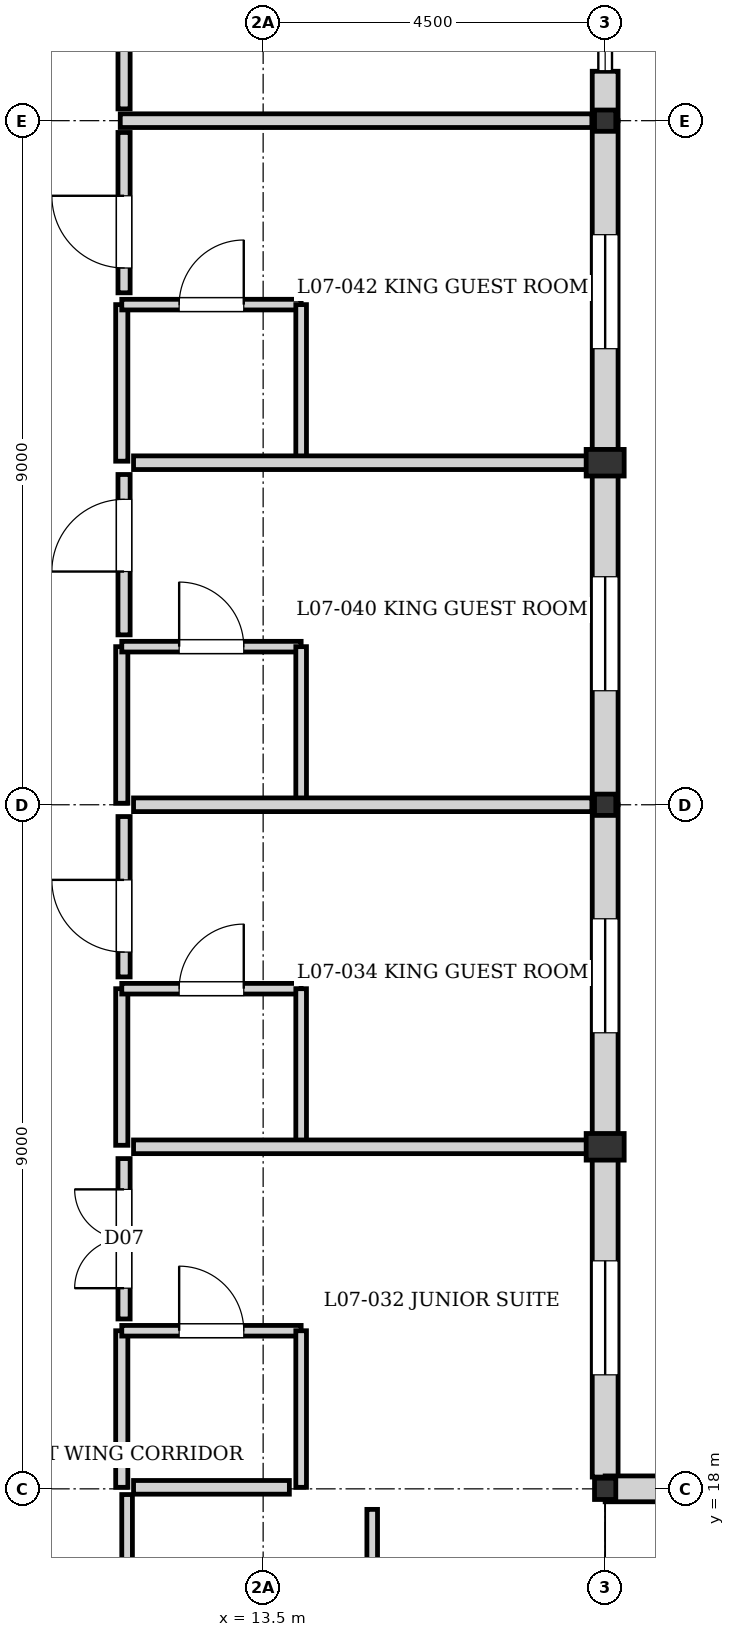
"""IFC4 building model, lengths in metres.
Left out: names, types, materials, properties, quantities, classifications, styles, units other than length and angle.
Written with IfcOpenShell. Run it as: python <this file> out.ifc"""

import sys

from ifc_helpers import new_model, si_unit, direction, frame, frame_2d, origin, origin_2d, place, context, subcontext, project, spatial, rectangle, i_section, extrude, element, fill, save


model = new_model("IFC4")
c1 = context("Model", 3, precision=1e-05, world=origin(), true_north=direction((0.0, 1.0)))
c2 = subcontext(c1, "Body", "Model", "MODEL_VIEW")
j1 = project(units=[si_unit("LENGTHUNIT", "METRE"), si_unit("PLANEANGLEUNIT", "RADIAN")], contexts=[c1])
p1 = place(None, origin())
s1 = spatial("IfcSite", under=j1, at=p1, CompositionType="ELEMENT")
p2 = place(p1, origin())
s2 = spatial("IfcBuilding", under=s1, at=p2, CompositionType="ELEMENT")
p3 = place(p2, frame((0.0, 0.0, 23.68)))
s3 = spatial("IfcBuildingStorey", under=s2, at=p3, CompositionType="ELEMENT", Elevation=23.68)
for number, where, z_axis, x_axis in (
    (1, (18.0, 18.0, 0.0), (0.0, 0.0, 1.0), (1.0, 0.0, 0.0)),
    (2, (18.0, 27.0, 0.0), (0.0, 0.0, 1.0), (1.0, 0.0, 0.0)),
    (3, (18.0, 36.0, 0.0), (0.0, 0.0, 1.0), (1.0, 0.0, 0.0)),
):
    element("IfcColumn", number, at=place(p3, frame(where, z_axis=z_axis, x_axis=x_axis)), inside=s3, PredefinedType="COLUMN", context=c2, shape_type="SweptSolid", body=[
        extrude(i_section(OverallWidth=0.28, OverallDepth=0.28, WebThickness=0.01, FlangeThickness=0.018, at=origin_2d()), origin(), (0.0, 0.0, 1.0), 3.2),
    ])
for number, where, z_axis, x_axis in (
    (4, (18.0, 22.5, 0.0), (0.0, 0.0, 1.0), (0.0, 1.0, 0.0)),
    (5, (18.0, 31.5, 0.0), (0.0, 0.0, 1.0), (0.0, 1.0, 0.0)),
):
    element("IfcColumn", number, at=place(p3, frame(where, z_axis=z_axis, x_axis=x_axis)), inside=s3, PredefinedType="PILASTER", context=c2, shape_type="SweptSolid", body=[
        extrude(rectangle(XDim=0.35, YDim=0.5, at=origin_2d()), origin(), (0.0, 0.0, 1.0), 3.2),
    ])
p4 = place(p3, frame((18.0, 36.65, 0.0), z_axis=(0.0, 0.0, 1.0), x_axis=(0.0, -1.0, 0.0)))
e6 = element("IfcWall", 6, at=p4, inside=s3, PredefinedType="SOLIDWALL", context=c2, shape_type="SweptSolid", body=[
    extrude(rectangle(XDim=0.65, YDim=0.34, at=frame_2d((0.325, 0.0))), origin(), (0.0, 0.0, 1.0), 2.6),
])
p5 = place(p3, frame((18.0, 36.0, 0.0), z_axis=(0.0, 0.0, 1.0), x_axis=(0.0, -1.0, 0.0)))
e7 = element("IfcWall", 7, at=p5, inside=s3, PredefinedType="SOLIDWALL", context=c2, shape_type="SweptSolid", body=[
    extrude(rectangle(XDim=9.0, YDim=0.34, at=frame_2d((4.5, 0.0))), origin(), (0.0, 0.0, 1.0), 2.66),
])
p6 = place(p5, frame((1.5, 0.0, 0.35)))
e8 = element("IfcOpeningElement", 8, at=p6, cuts=e7, PredefinedType="OPENING", context=c2, shape_type="SweptSolid", body=[
    extrude(rectangle(XDim=1.5, YDim=1.8, at=frame_2d((0.75, 0.9))), frame((0.0, 0.18, 0.0), z_axis=(0.0, -1.0, 0.0), x_axis=(1.0, 0.0, 0.0)), (0.0, 0.0, 1.0), 0.36),
])
p7 = place(p5, frame((6.0, 0.0, 0.35)))
e9 = element("IfcOpeningElement", 9, at=p7, cuts=e7, PredefinedType="OPENING", context=c2, shape_type="SweptSolid", body=[
    extrude(rectangle(XDim=1.5, YDim=1.8, at=frame_2d((0.75, 0.9))), frame((0.0, 0.18, 0.0), z_axis=(0.0, -1.0, 0.0), x_axis=(1.0, 0.0, 0.0)), (0.0, 0.0, 1.0), 0.36),
])
p8 = place(p3, frame((18.0, 27.0, 0.0), z_axis=(0.0, 0.0, 1.0), x_axis=(0.0, -1.0, 0.0)))
e10 = element("IfcWall", 10, at=p8, inside=s3, PredefinedType="SOLIDWALL", context=c2, shape_type="SweptSolid", body=[
    extrude(rectangle(XDim=8.845, YDim=0.34, at=frame_2d((4.422, 0.0))), origin(), (0.0, 0.0, 1.0), 2.96),
])
p9 = place(p8, frame((1.5, 0.0, 0.35)))
e11 = element("IfcOpeningElement", 11, at=p9, cuts=e10, PredefinedType="OPENING", context=c2, shape_type="SweptSolid", body=[
    extrude(rectangle(XDim=1.5, YDim=1.8, at=frame_2d((0.75, 0.9))), frame((0.0, 0.18, 0.0), z_axis=(0.0, -1.0, 0.0), x_axis=(1.0, 0.0, 0.0)), (0.0, 0.0, 1.0), 0.36),
])
p10 = place(p8, frame((6.0, 0.0, 0.35)))
e12 = element("IfcOpeningElement", 12, at=p10, cuts=e10, PredefinedType="OPENING", context=c2, shape_type="SweptSolid", body=[
    extrude(rectangle(XDim=1.5, YDim=1.8, at=frame_2d((0.75, 0.9))), frame((0.0, 0.18, 0.0), z_axis=(0.0, -1.0, 0.0), x_axis=(1.0, 0.0, 0.0)), (0.0, 0.0, 1.0), 0.36),
])
p11 = place(p3, frame((18.0, 18.0, 0.0), z_axis=(0.0, 0.0, 1.0), x_axis=(1.0, 0.0, 0.0)))
e13 = element("IfcWall", 13, at=p11, inside=s3, PredefinedType="SOLIDWALL", context=c2, shape_type="SweptSolid", body=[
    extrude(rectangle(XDim=9.0, YDim=0.34, at=frame_2d((4.5, 0.0))), origin(), (0.0, 0.0, 1.0), 2.56),
])
p12 = place(p11, frame((1.5, 0.0, 0.35)))
e14 = element("IfcOpeningElement", 14, at=p12, cuts=e13, PredefinedType="OPENING", context=c2, shape_type="SweptSolid", body=[
    extrude(rectangle(XDim=1.5, YDim=1.8, at=frame_2d((0.75, 0.9))), frame((0.0, 0.18, 0.0), z_axis=(0.0, -1.0, 0.0), x_axis=(1.0, 0.0, 0.0)), (0.0, 0.0, 1.0), 0.36),
])
p13 = place(p11, frame((6.0, 0.0, 0.35)))
e15 = element("IfcOpeningElement", 15, at=p13, cuts=e13, PredefinedType="OPENING", context=c2, shape_type="SweptSolid", body=[
    extrude(rectangle(XDim=1.5, YDim=1.8, at=frame_2d((0.75, 0.9))), frame((0.0, 0.18, 0.0), z_axis=(0.0, -1.0, 0.0), x_axis=(1.0, 0.0, 0.0)), (0.0, 0.0, 1.0), 0.36),
])
p14 = place(p3, frame((11.64, 18.02, 0.0), z_axis=(0.0, 0.0, 1.0), x_axis=(0.0, 1.0, 0.0)))
e16 = element("IfcWall", 16, at=p14, inside=s3, PredefinedType="PARTITIONING", context=c2, shape_type="SweptSolid", body=[
    extrude(rectangle(XDim=2.06, YDim=0.16, at=frame_2d((1.03, 0.0))), origin(), (0.0, 0.0, 1.0), 2.96),
])
p15 = place(p3, frame((11.64, 20.08, 0.0), z_axis=(0.0, 0.0, 1.0), x_axis=(1.0, 0.0, 0.0)))
e17 = element("IfcWall", 17, at=p15, inside=s3, PredefinedType="PLUMBINGWALL", context=c2, shape_type="SweptSolid", body=[
    extrude(rectangle(XDim=2.36, YDim=0.14, at=frame_2d((1.18, 0.0))), origin(), (0.0, 0.0, 1.0), 2.96),
])
p16 = place(p15, frame((0.755, 0.0, 0.0)))
e18 = element("IfcOpeningElement", 18, at=p16, cuts=e17, PredefinedType="OPENING", context=c2, shape_type="SweptSolid", body=[
    extrude(rectangle(XDim=0.85, YDim=2.04, at=frame_2d((0.425, 1.02))), frame((0.0, 0.08, 0.0), z_axis=(0.0, -1.0, 0.0), x_axis=(1.0, 0.0, 0.0)), (0.0, 0.0, 1.0), 0.16),
])
p17 = place(p3, frame((14.0, 18.02, 0.0), z_axis=(0.0, 0.0, 1.0), x_axis=(0.0, 1.0, 0.0)))
e19 = element("IfcWall", 19, at=p17, inside=s3, PredefinedType="PLUMBINGWALL", context=c2, shape_type="SweptSolid", body=[
    extrude(rectangle(XDim=2.06, YDim=0.14, at=frame_2d((1.03, 0.0))), origin(), (0.0, 0.0, 1.0), 2.96),
])
p18 = place(p3, frame((11.64, 22.52, 0.0), z_axis=(0.0, 0.0, 1.0), x_axis=(0.0, 1.0, 0.0)))
e20 = element("IfcWall", 20, at=p18, inside=s3, PredefinedType="PARTITIONING", context=c2, shape_type="SweptSolid", body=[
    extrude(rectangle(XDim=2.06, YDim=0.16, at=frame_2d((1.03, 0.0))), origin(), (0.0, 0.0, 1.0), 2.96),
])
p19 = place(p3, frame((11.64, 24.58, 0.0), z_axis=(0.0, 0.0, 1.0), x_axis=(1.0, 0.0, 0.0)))
e21 = element("IfcWall", 21, at=p19, inside=s3, PredefinedType="PLUMBINGWALL", context=c2, shape_type="SweptSolid", body=[
    extrude(rectangle(XDim=2.36, YDim=0.14, at=frame_2d((1.18, 0.0))), origin(), (0.0, 0.0, 1.0), 2.96),
])
p20 = place(p19, frame((0.755, 0.0, 0.0)))
e22 = element("IfcOpeningElement", 22, at=p20, cuts=e21, PredefinedType="OPENING", context=c2, shape_type="SweptSolid", body=[
    extrude(rectangle(XDim=0.85, YDim=2.04, at=frame_2d((0.425, 1.02))), frame((0.0, 0.08, 0.0), z_axis=(0.0, -1.0, 0.0), x_axis=(1.0, 0.0, 0.0)), (0.0, 0.0, 1.0), 0.16),
])
p21 = place(p3, frame((14.0, 22.52, 0.0), z_axis=(0.0, 0.0, 1.0), x_axis=(0.0, 1.0, 0.0)))
e23 = element("IfcWall", 23, at=p21, inside=s3, PredefinedType="PLUMBINGWALL", context=c2, shape_type="SweptSolid", body=[
    extrude(rectangle(XDim=2.06, YDim=0.14, at=frame_2d((1.03, 0.0))), origin(), (0.0, 0.0, 1.0), 2.96),
])
p22 = place(p3, frame((11.64, 27.02, 0.0), z_axis=(0.0, 0.0, 1.0), x_axis=(0.0, 1.0, 0.0)))
e24 = element("IfcWall", 24, at=p22, inside=s3, PredefinedType="PARTITIONING", context=c2, shape_type="SweptSolid", body=[
    extrude(rectangle(XDim=2.06, YDim=0.16, at=frame_2d((1.03, 0.0))), origin(), (0.0, 0.0, 1.0), 2.96),
])
p23 = place(p3, frame((11.64, 29.08, 0.0), z_axis=(0.0, 0.0, 1.0), x_axis=(1.0, 0.0, 0.0)))
e25 = element("IfcWall", 25, at=p23, inside=s3, PredefinedType="PLUMBINGWALL", context=c2, shape_type="SweptSolid", body=[
    extrude(rectangle(XDim=2.36, YDim=0.14, at=frame_2d((1.18, 0.0))), origin(), (0.0, 0.0, 1.0), 2.96),
])
p24 = place(p23, frame((0.755, 0.0, 0.0)))
e26 = element("IfcOpeningElement", 26, at=p24, cuts=e25, PredefinedType="OPENING", context=c2, shape_type="SweptSolid", body=[
    extrude(rectangle(XDim=0.85, YDim=2.04, at=frame_2d((0.425, 1.02))), frame((0.0, 0.08, 0.0), z_axis=(0.0, -1.0, 0.0), x_axis=(1.0, 0.0, 0.0)), (0.0, 0.0, 1.0), 0.16),
])
p25 = place(p3, frame((14.0, 27.02, 0.0), z_axis=(0.0, 0.0, 1.0), x_axis=(0.0, 1.0, 0.0)))
e27 = element("IfcWall", 27, at=p25, inside=s3, PredefinedType="PLUMBINGWALL", context=c2, shape_type="SweptSolid", body=[
    extrude(rectangle(XDim=2.06, YDim=0.14, at=frame_2d((1.03, 0.0))), origin(), (0.0, 0.0, 1.0), 2.96),
])
p26 = place(p3, frame((11.64, 31.52, 0.0), z_axis=(0.0, 0.0, 1.0), x_axis=(0.0, 1.0, 0.0)))
e28 = element("IfcWall", 28, at=p26, inside=s3, PredefinedType="PARTITIONING", context=c2, shape_type="SweptSolid", body=[
    extrude(rectangle(XDim=2.06, YDim=0.16, at=frame_2d((1.03, 0.0))), origin(), (0.0, 0.0, 1.0), 2.96),
])
p27 = place(p3, frame((11.64, 33.58, 0.0), z_axis=(0.0, 0.0, 1.0), x_axis=(1.0, 0.0, 0.0)))
e29 = element("IfcWall", 29, at=p27, inside=s3, PredefinedType="PLUMBINGWALL", context=c2, shape_type="SweptSolid", body=[
    extrude(rectangle(XDim=2.36, YDim=0.14, at=frame_2d((1.18, 0.0))), origin(), (0.0, 0.0, 1.0), 2.96),
])
p28 = place(p27, frame((0.755, 0.0, 0.0)))
e30 = element("IfcOpeningElement", 30, at=p28, cuts=e29, PredefinedType="OPENING", context=c2, shape_type="SweptSolid", body=[
    extrude(rectangle(XDim=0.85, YDim=2.04, at=frame_2d((0.425, 1.02))), frame((0.0, 0.08, 0.0), z_axis=(0.0, -1.0, 0.0), x_axis=(1.0, 0.0, 0.0)), (0.0, 0.0, 1.0), 0.16),
])
p29 = place(p3, frame((14.0, 31.52, 0.0), z_axis=(0.0, 0.0, 1.0), x_axis=(0.0, 1.0, 0.0)))
e31 = element("IfcWall", 31, at=p29, inside=s3, PredefinedType="PLUMBINGWALL", context=c2, shape_type="SweptSolid", body=[
    extrude(rectangle(XDim=2.06, YDim=0.14, at=frame_2d((1.03, 0.0))), origin(), (0.0, 0.0, 1.0), 2.96),
])
p30 = place(p3, frame((11.795, 22.5, 0.0), z_axis=(0.0, 0.0, 1.0), x_axis=(1.0, 0.0, 0.0)))
e32 = element("IfcWall", 32, at=p30, inside=s3, PredefinedType="PARTITIONING", context=c2, shape_type="SweptSolid", body=[
    extrude(rectangle(XDim=6.03, YDim=0.18, at=frame_2d((3.015, 0.0))), origin(), (0.0, 0.0, 1.0), 2.96),
])
p31 = place(p3, frame((11.795, 27.0, 0.0), z_axis=(0.0, 0.0, 1.0), x_axis=(1.0, 0.0, 0.0)))
e33 = element("IfcWall", 33, at=p31, inside=s3, PredefinedType="PARTITIONING", context=c2, shape_type="SweptSolid", body=[
    extrude(rectangle(XDim=6.03, YDim=0.18, at=frame_2d((3.015, 0.0))), origin(), (0.0, 0.0, 1.0), 2.56),
])
p32 = place(p3, frame((11.795, 31.5, 0.0), z_axis=(0.0, 0.0, 1.0), x_axis=(1.0, 0.0, 0.0)))
e34 = element("IfcWall", 34, at=p32, inside=s3, PredefinedType="PARTITIONING", context=c2, shape_type="SweptSolid", body=[
    extrude(rectangle(XDim=6.03, YDim=0.18, at=frame_2d((3.015, 0.0))), origin(), (0.0, 0.0, 1.0), 2.96),
])
p33 = place(p3, frame((11.62, 36.0, 0.0), z_axis=(0.0, 0.0, 1.0), x_axis=(1.0, 0.0, 0.0)))
e35 = element("IfcWall", 35, at=p33, inside=s3, PredefinedType="PARTITIONING", context=c2, shape_type="SweptSolid", body=[
    extrude(rectangle(XDim=6.205, YDim=0.18, at=frame_2d((3.103, 0.0))), origin(), (0.0, 0.0, 1.0), 2.51),
])
p34 = place(p3, frame((11.795, 18.02, 0.0), z_axis=(0.0, 0.0, 1.0), x_axis=(1.0, 0.0, 0.0)))
e36 = element("IfcWall", 36, at=p34, inside=s3, PredefinedType="PARTITIONING", context=c2, shape_type="SweptSolid", body=[
    extrude(rectangle(XDim=2.05, YDim=0.18, at=frame_2d((1.025, 0.0))), origin(), (0.0, 0.0, 1.0), 2.6),
])
p35 = place(p3, frame((11.71, 11.705, 0.0), z_axis=(0.0, 0.0, 1.0), x_axis=(0.0, 1.0, 0.0)))
e37 = element("IfcWall", 37, at=p35, inside=s3, PredefinedType="PLUMBINGWALL", context=c2, shape_type="SweptSolid", body=[
    extrude(rectangle(XDim=6.22, YDim=0.14, at=frame_2d((3.11, 0.0))), origin(), (0.0, 0.0, 1.0), 2.96),
])
p36 = place(p35, frame((1.914, 0.0, 0.0)))
e38 = element("IfcOpeningElement", 38, at=p36, cuts=e37, PredefinedType="OPENING", context=c2, shape_type="SweptSolid", body=[
    extrude(rectangle(XDim=0.9, YDim=2.1, at=frame_2d((0.45, 1.05))), frame((0.0, 0.08, 0.0), z_axis=(0.0, -1.0, 0.0), x_axis=(1.0, 0.0, 0.0)), (0.0, 0.0, 1.0), 0.16),
])
p37 = place(p3, frame((11.67, 20.235, 0.0), z_axis=(0.0, 0.0, 1.0), x_axis=(0.0, 1.0, 0.0)))
e39 = element("IfcWall", 39, at=p37, inside=s3, PredefinedType="PARTITIONING", context=c2, shape_type="SweptSolid", body=[
    extrude(rectangle(XDim=2.11, YDim=0.16, at=frame_2d((1.055, 0.0))), origin(), (0.0, 0.0, 1.0), 2.96),
])
p38 = place(p37, frame((0.405, 0.0, 0.0)))
e40 = element("IfcOpeningElement", 40, at=p38, cuts=e39, PredefinedType="OPENING", context=c2, shape_type="SweptSolid", body=[
    extrude(rectangle(XDim=1.3, YDim=2.25, at=frame_2d((0.65, 1.125))), frame((0.0, 0.09, 0.0), z_axis=(0.0, -1.0, 0.0), x_axis=(1.0, 0.0, 0.0)), (0.0, 0.0, 1.0), 0.18),
])
p39 = place(p3, frame((11.67, 24.735, 0.0), z_axis=(0.0, 0.0, 1.0), x_axis=(0.0, 1.0, 0.0)))
e41 = element("IfcWall", 41, at=p39, inside=s3, PredefinedType="PARTITIONING", context=c2, shape_type="SweptSolid", body=[
    extrude(rectangle(XDim=2.11, YDim=0.16, at=frame_2d((1.055, 0.0))), origin(), (0.0, 0.0, 1.0), 2.96),
])
p40 = place(p39, frame((0.327, 0.0, 0.0)))
e42 = element("IfcOpeningElement", 42, at=p40, cuts=e41, PredefinedType="OPENING", context=c2, shape_type="SweptSolid", body=[
    extrude(rectangle(XDim=0.95, YDim=2.15, at=frame_2d((0.475, 1.075))), frame((0.0, 0.09, 0.0), z_axis=(0.0, -1.0, 0.0), x_axis=(1.0, 0.0, 0.0)), (0.0, 0.0, 1.0), 0.18),
])
p41 = place(p3, frame((11.67, 29.235, 0.0), z_axis=(0.0, 0.0, 1.0), x_axis=(0.0, 1.0, 0.0)))
e43 = element("IfcWall", 43, at=p41, inside=s3, PredefinedType="PARTITIONING", context=c2, shape_type="SweptSolid", body=[
    extrude(rectangle(XDim=2.11, YDim=0.16, at=frame_2d((1.055, 0.0))), origin(), (0.0, 0.0, 1.0), 2.96),
])
p42 = place(p41, frame((0.833, 0.0, 0.0)))
e44 = element("IfcOpeningElement", 44, at=p42, cuts=e43, PredefinedType="OPENING", context=c2, shape_type="SweptSolid", body=[
    extrude(rectangle(XDim=0.95, YDim=2.15, at=frame_2d((0.475, 1.075))), frame((0.0, 0.09, 0.0), z_axis=(0.0, -1.0, 0.0), x_axis=(1.0, 0.0, 0.0)), (0.0, 0.0, 1.0), 0.18),
])
p43 = place(p3, frame((11.67, 33.735, 0.0), z_axis=(0.0, 0.0, 1.0), x_axis=(0.0, 1.0, 0.0)))
e45 = element("IfcWall", 45, at=p43, inside=s3, PredefinedType="PARTITIONING", context=c2, shape_type="SweptSolid", body=[
    extrude(rectangle(XDim=2.11, YDim=0.16, at=frame_2d((1.055, 0.0))), origin(), (0.0, 0.0, 1.0), 2.96),
])
p44 = place(p43, frame((0.327, 0.0, 0.0)))
e46 = element("IfcOpeningElement", 46, at=p44, cuts=e45, PredefinedType="OPENING", context=c2, shape_type="SweptSolid", body=[
    extrude(rectangle(XDim=0.95, YDim=2.15, at=frame_2d((0.475, 1.075))), frame((0.0, 0.09, 0.0), z_axis=(0.0, -1.0, 0.0), x_axis=(1.0, 0.0, 0.0)), (0.0, 0.0, 1.0), 0.18),
])
p45 = place(p3, frame((11.67, 36.155, 0.0), z_axis=(0.0, 0.0, 1.0), x_axis=(0.0, 1.0, 0.0)))
e47 = element("IfcWall", 47, at=p45, inside=s3, PredefinedType="PARTITIONING", context=c2, shape_type="SweptSolid", body=[
    extrude(rectangle(XDim=4.125, YDim=0.16, at=frame_2d((2.062, 0.0))), origin(), (0.0, 0.0, 1.0), 2.96),
])
p46 = place(p45, frame((2.058, 0.0, 0.0)))
e48 = element("IfcOpeningElement", 48, at=p46, cuts=e47, PredefinedType="OPENING", context=c2, shape_type="SweptSolid", body=[
    extrude(rectangle(XDim=1.0, YDim=2.1, at=frame_2d((0.5, 1.05))), frame((0.0, 0.09, 0.0), z_axis=(0.0, -1.0, 0.0), x_axis=(1.0, 0.0, 0.0)), (0.0, 0.0, 1.0), 0.18),
])
p47 = place(p3, frame((14.935, 14.845, 0.0), z_axis=(0.0, 0.0, 1.0), x_axis=(0.0, 1.0, 0.0)))
e49 = element("IfcWall", 49, at=p47, inside=s3, PredefinedType="PLUMBINGWALL", context=c2, shape_type="SweptSolid", body=[
    extrude(rectangle(XDim=2.885, YDim=0.14, at=frame_2d((1.442, 0.0))), origin(), (0.0, 0.0, 1.0), 2.96),
])
p48 = place(p47, frame((0.646, 0.0, 0.0)))
e50 = element("IfcOpeningElement", 50, at=p48, cuts=e49, PredefinedType="OPENING", context=c2, shape_type="SweptSolid", body=[
    extrude(rectangle(XDim=0.9, YDim=2.1, at=frame_2d((0.45, 1.05))), frame((0.0, 0.08, 0.0), z_axis=(0.0, -1.0, 0.0), x_axis=(1.0, 0.0, 0.0)), (0.0, 0.0, 1.0), 0.16),
])
p49 = place(p6, origin())
e51 = element("IfcWindow", 51, at=p49, inside=s3, PartitioningType="SINGLE_PANEL", PredefinedType="WINDOW", context=c2, shape_type="SweptSolid", body=[
    extrude(rectangle(XDim=1.5, YDim=1.8, at=frame_2d((0.75, 0.9))), frame((0.0, 0.03, 0.0), z_axis=(0.0, -1.0, 0.0), x_axis=(1.0, 0.0, 0.0)), (0.0, 0.0, 1.0), 0.06),
])
fill(e8, e51)
p50 = place(p7, origin())
e52 = element("IfcWindow", 52, at=p50, inside=s3, PartitioningType="SINGLE_PANEL", PredefinedType="WINDOW", context=c2, shape_type="SweptSolid", body=[
    extrude(rectangle(XDim=1.5, YDim=1.8, at=frame_2d((0.75, 0.9))), frame((0.0, 0.03, 0.0), z_axis=(0.0, -1.0, 0.0), x_axis=(1.0, 0.0, 0.0)), (0.0, 0.0, 1.0), 0.06),
])
fill(e9, e52)
p51 = place(p9, origin())
e53 = element("IfcWindow", 53, at=p51, inside=s3, PartitioningType="SINGLE_PANEL", PredefinedType="WINDOW", context=c2, shape_type="SweptSolid", body=[
    extrude(rectangle(XDim=1.5, YDim=1.8, at=frame_2d((0.75, 0.9))), frame((0.0, 0.03, 0.0), z_axis=(0.0, -1.0, 0.0), x_axis=(1.0, 0.0, 0.0)), (0.0, 0.0, 1.0), 0.06),
])
fill(e11, e53)
p52 = place(p10, origin())
e54 = element("IfcWindow", 54, at=p52, inside=s3, PartitioningType="SINGLE_PANEL", PredefinedType="WINDOW", context=c2, shape_type="SweptSolid", body=[
    extrude(rectangle(XDim=1.5, YDim=1.8, at=frame_2d((0.75, 0.9))), frame((0.0, 0.03, 0.0), z_axis=(0.0, -1.0, 0.0), x_axis=(1.0, 0.0, 0.0)), (0.0, 0.0, 1.0), 0.06),
])
fill(e12, e54)
p53 = place(p16, origin())
e55 = element("IfcDoor", 55, at=p53, inside=s3, OperationType="SINGLE_SWING_LEFT", PredefinedType="DOOR", context=c2, shape_type="SweptSolid", body=[
    extrude(rectangle(XDim=0.85, YDim=2.04, at=frame_2d((0.425, 1.02))), frame((0.0, 0.025, 0.0), z_axis=(0.0, -1.0, 0.0), x_axis=(1.0, 0.0, 0.0)), (0.0, 0.0, 1.0), 0.05),
])
fill(e18, e55)
p54 = place(p20, origin())
e56 = element("IfcDoor", 56, at=p54, inside=s3, OperationType="SINGLE_SWING_RIGHT", PredefinedType="DOOR", context=c2, shape_type="SweptSolid", body=[
    extrude(rectangle(XDim=0.85, YDim=2.04, at=frame_2d((0.425, 1.02))), frame((0.0, 0.025, 0.0), z_axis=(0.0, -1.0, 0.0), x_axis=(1.0, 0.0, 0.0)), (0.0, 0.0, 1.0), 0.05),
])
fill(e22, e56)
p55 = place(p24, origin())
e57 = element("IfcDoor", 57, at=p55, inside=s3, OperationType="SINGLE_SWING_LEFT", PredefinedType="DOOR", context=c2, shape_type="SweptSolid", body=[
    extrude(rectangle(XDim=0.85, YDim=2.04, at=frame_2d((0.425, 1.02))), frame((0.0, 0.025, 0.0), z_axis=(0.0, -1.0, 0.0), x_axis=(1.0, 0.0, 0.0)), (0.0, 0.0, 1.0), 0.05),
])
fill(e26, e57)
p56 = place(p28, origin())
e58 = element("IfcDoor", 58, at=p56, inside=s3, OperationType="SINGLE_SWING_RIGHT", PredefinedType="DOOR", context=c2, shape_type="SweptSolid", body=[
    extrude(rectangle(XDim=0.85, YDim=2.04, at=frame_2d((0.425, 1.02))), frame((0.0, 0.025, 0.0), z_axis=(0.0, -1.0, 0.0), x_axis=(1.0, 0.0, 0.0)), (0.0, 0.0, 1.0), 0.05),
])
fill(e30, e58)
p57 = place(p38, origin())
e59 = element("IfcDoor", 59, at=p57, inside=s3, OperationType="DOUBLE_DOOR_SINGLE_SWING", PredefinedType="DOOR", context=c2, shape_type="SweptSolid", body=[
    extrude(rectangle(XDim=1.3, YDim=2.25, at=frame_2d((0.65, 1.125))), frame((0.0, 0.025, 0.0), z_axis=(0.0, -1.0, 0.0), x_axis=(1.0, 0.0, 0.0)), (0.0, 0.0, 1.0), 0.05),
])
fill(e40, e59)
p58 = place(p40, origin())
e60 = element("IfcDoor", 60, at=p58, inside=s3, OperationType="SINGLE_SWING_RIGHT", PredefinedType="DOOR", context=c2, shape_type="SweptSolid", body=[
    extrude(rectangle(XDim=0.95, YDim=2.15, at=frame_2d((0.475, 1.075))), frame((0.0, 0.025, 0.0), z_axis=(0.0, -1.0, 0.0), x_axis=(1.0, 0.0, 0.0)), (0.0, 0.0, 1.0), 0.05),
])
fill(e42, e60)
p59 = place(p42, origin())
e61 = element("IfcDoor", 61, at=p59, inside=s3, OperationType="SINGLE_SWING_LEFT", PredefinedType="DOOR", context=c2, shape_type="SweptSolid", body=[
    extrude(rectangle(XDim=0.95, YDim=2.15, at=frame_2d((0.475, 1.075))), frame((0.0, 0.025, 0.0), z_axis=(0.0, -1.0, 0.0), x_axis=(1.0, 0.0, 0.0)), (0.0, 0.0, 1.0), 0.05),
])
fill(e44, e61)
p60 = place(p44, origin())
e62 = element("IfcDoor", 62, at=p60, inside=s3, OperationType="SINGLE_SWING_RIGHT", PredefinedType="DOOR", context=c2, shape_type="SweptSolid", body=[
    extrude(rectangle(XDim=0.95, YDim=2.15, at=frame_2d((0.475, 1.075))), frame((0.0, 0.025, 0.0), z_axis=(0.0, -1.0, 0.0), x_axis=(1.0, 0.0, 0.0)), (0.0, 0.0, 1.0), 0.05),
])
fill(e46, e62)
save(model, sys.argv[1])
